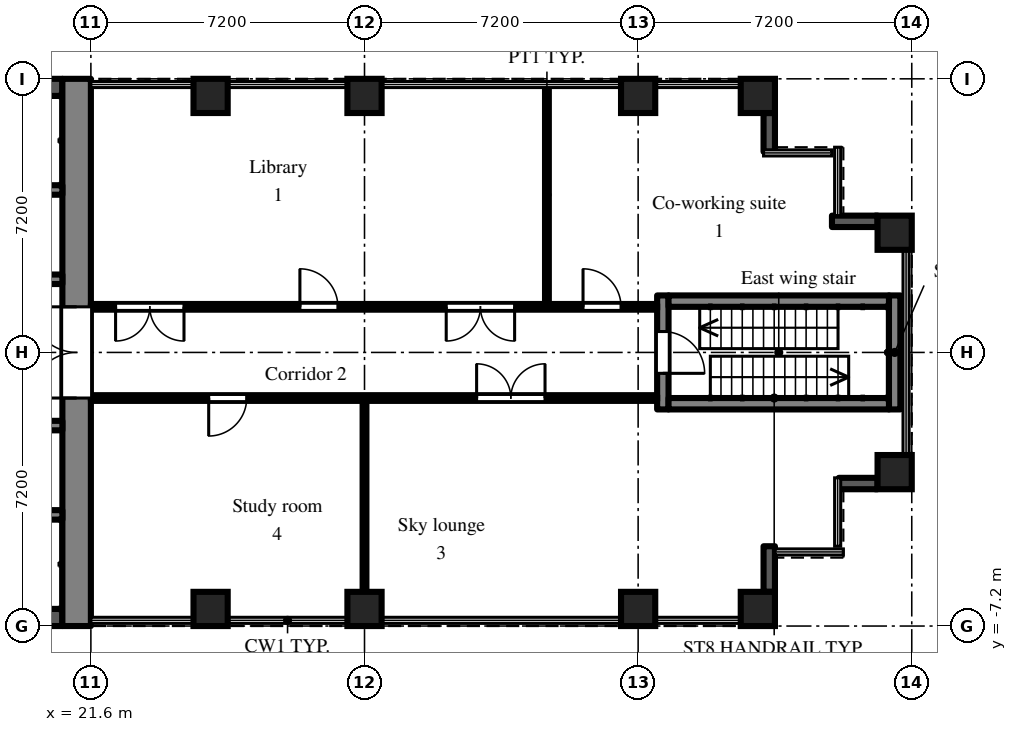
"""IFC4 building model, lengths in metres.
Left out: names, types, materials, properties, quantities, classifications, styles, units other than length and angle.
Written with IfcOpenShell. Run it as: python <this file> out.ifc"""

import sys

from ifc_helpers import new_model, si_unit, direction, frame, frame_2d, origin, origin_2d, place, context, subcontext, project, spatial, rectangle, extrude, element, fill, save


model = new_model("IFC4")
c1 = context("Model", 3, precision=1e-05, world=origin(), true_north=direction((0.0, 1.0)))
c2 = subcontext(c1, "Body", "Model", "MODEL_VIEW")
j1 = project(units=[si_unit("LENGTHUNIT", "METRE"), si_unit("PLANEANGLEUNIT", "RADIAN")], contexts=[c1])
p1 = place(None, origin())
s1 = spatial("IfcSite", under=j1, at=p1, CompositionType="ELEMENT")
p2 = place(p1, origin())
s2 = spatial("IfcBuilding", under=s1, at=p2, CompositionType="ELEMENT")
p3 = place(p2, frame((0.0, 0.0, 116.1)))
s3 = spatial("IfcBuildingStorey", under=s2, at=p3, CompositionType="ELEMENT", Elevation=116.1)
for number, where, z_axis, x_axis in (
    (1, (24.75, -6.75, 0.0), (0.0, 0.0, 1.0), (1.0, 0.0, 0.0)),
    (2, (24.75, 6.75, 0.0), (0.0, 0.0, 1.0), (1.0, 0.0, 0.0)),
    (3, (28.8, -6.75, 0.0), (0.0, 0.0, 1.0), (1.0, 0.0, 0.0)),
    (4, (28.8, 6.75, 0.0), (0.0, 0.0, 1.0), (1.0, 0.0, 0.0)),
    (5, (36.0, -6.75, 0.0), (0.0, 0.0, 1.0), (1.0, 0.0, 0.0)),
    (6, (36.0, 6.75, 0.0), (0.0, 0.0, 1.0), (1.0, 0.0, 0.0)),
    (7, (39.15, -6.75, 0.0), (0.0, 0.0, 1.0), (1.0, 0.0, 0.0)),
    (8, (39.15, 6.75, 0.0), (0.0, 0.0, 1.0), (1.0, 0.0, 0.0)),
    (9, (42.75, -3.15, 0.0), (0.0, 0.0, 1.0), (1.0, 0.0, 0.0)),
    (10, (42.75, 3.15, 0.0), (0.0, 0.0, 1.0), (1.0, 0.0, 0.0)),
):
    element("IfcColumn", number, at=place(p3, frame(where, z_axis=z_axis, x_axis=x_axis)), inside=s3, PredefinedType="COLUMN", context=c2, shape_type="SweptSolid", body=[
        extrude(rectangle(XDim=0.9, YDim=0.9, at=origin_2d()), origin(), (0.0, 0.0, 1.0), 4.2),
    ])
p4 = place(p3, frame((39.45, -6.3, 0.0), z_axis=(0.0, 0.0, 1.0), x_axis=(0.0, 1.0, 0.0)))
e11 = element("IfcWall", 11, at=p4, inside=s3, PredefinedType="SOLIDWALL", context=c2, shape_type="SweptSolid", body=[
    extrude(rectangle(XDim=1.2, YDim=0.3, at=frame_2d((0.6, 0.0))), origin(), (0.0, 0.0, 1.0), 3.8),
])
p5 = place(p3, frame((41.28, -3.45, 0.0), z_axis=(0.0, 0.0, 1.0), x_axis=(1.0, 0.0, 0.0)))
e12 = element("IfcWall", 12, at=p5, inside=s3, PredefinedType="SOLIDWALL", context=c2, shape_type="SweptSolid", body=[
    extrude(rectangle(XDim=1.02, YDim=0.3, at=frame_2d((0.51, 0.0))), origin(), (0.0, 0.0, 1.0), 3.8),
])
p6 = place(p3, frame((42.3, 3.45, 0.0), z_axis=(0.0, 0.0, 1.0), x_axis=(-1.0, 0.0, 0.0)))
e13 = element("IfcWall", 13, at=p6, inside=s3, PredefinedType="SOLIDWALL", context=c2, shape_type="SweptSolid", body=[
    extrude(rectangle(XDim=1.2, YDim=0.3, at=frame_2d((0.6, 0.0))), origin(), (0.0, 0.0, 1.0), 3.8),
])
p7 = place(p3, frame((39.45, 5.28, 0.0), z_axis=(0.0, 0.0, 1.0), x_axis=(0.0, 1.0, 0.0)))
e14 = element("IfcWall", 14, at=p7, inside=s3, PredefinedType="SOLIDWALL", context=c2, shape_type="SweptSolid", body=[
    extrude(rectangle(XDim=1.02, YDim=0.3, at=frame_2d((0.51, 0.0))), origin(), (0.0, 0.0, 1.0), 3.8),
])
p8 = place(p3, frame((21.225, -7.2, 0.0), z_axis=(0.0, 0.0, 1.0), x_axis=(0.0, 1.0, 0.0)))
e15 = element("IfcWall", 15, at=p8, inside=s3, PredefinedType="SHEAR", context=c2, shape_type="SweptSolid", body=[
    extrude(rectangle(XDim=14.4, YDim=0.75, at=frame_2d((7.2, 0.0))), origin(), (0.0, 0.0, 1.0), 3.8),
])
p9 = place(p8, frame((6.0, 0.0, 0.0)))
e16 = element("IfcOpeningElement", 16, at=p9, cuts=e15, PredefinedType="OPENING", context=c2, shape_type="SweptSolid", body=[
    extrude(rectangle(XDim=2.4, YDim=2.2, at=frame_2d((1.2, 1.1))), frame((0.0, 0.385, 0.0), z_axis=(0.0, -1.0, 0.0), x_axis=(1.0, 0.0, 0.0)), (0.0, 0.0, 1.0), 0.77),
])
p10 = place(p3, frame((7.9, 6.975, 0.0), z_axis=(0.0, 0.0, 1.0), x_axis=(1.0, 0.0, 0.0)))
e17 = element("IfcWall", 17, at=p10, inside=s3, PredefinedType="SHEAR", context=c2, shape_type="SweptSolid", body=[
    extrude(rectangle(XDim=12.95, YDim=0.45, at=frame_2d((6.475, 0.0))), origin(), (0.0, 0.0, 1.0), 3.8),
])
p11 = place(p3, frame((7.9, 1.925, 0.0), z_axis=(0.0, 0.0, 1.0), x_axis=(1.0, 0.0, 0.0)))
e18 = element("IfcWall", 18, at=p11, inside=s3, PredefinedType="SHEAR", context=c2, shape_type="SweptSolid", body=[
    extrude(rectangle(XDim=12.95, YDim=0.25, at=frame_2d((6.475, 0.0))), origin(), (0.0, 0.0, 1.0), 3.8),
])
p12 = place(p11, frame((4.825, 0.0, 0.0)))
e19 = element("IfcOpeningElement", 19, at=p12, cuts=e18, PredefinedType="OPENING", context=c2, shape_type="SweptSolid", body=[
    extrude(rectangle(XDim=1.1, YDim=2.1, at=frame_2d((0.55, 1.05))), frame((0.0, 0.135, 0.0), z_axis=(0.0, -1.0, 0.0), x_axis=(1.0, 0.0, 0.0)), (0.0, 0.0, 1.0), 0.27),
])
p13 = place(p11, frame((7.025, 0.0, 0.0)))
e20 = element("IfcOpeningElement", 20, at=p13, cuts=e18, PredefinedType="OPENING", context=c2, shape_type="SweptSolid", body=[
    extrude(rectangle(XDim=1.1, YDim=2.1, at=frame_2d((0.55, 1.05))), frame((0.0, 0.135, 0.0), z_axis=(0.0, -1.0, 0.0), x_axis=(1.0, 0.0, 0.0)), (0.0, 0.0, 1.0), 0.27),
])
p14 = place(p11, frame((9.225, 0.0, 0.0)))
e21 = element("IfcOpeningElement", 21, at=p14, cuts=e18, PredefinedType="OPENING", context=c2, shape_type="SweptSolid", body=[
    extrude(rectangle(XDim=1.1, YDim=2.1, at=frame_2d((0.55, 1.05))), frame((0.0, 0.135, 0.0), z_axis=(0.0, -1.0, 0.0), x_axis=(1.0, 0.0, 0.0)), (0.0, 0.0, 1.0), 0.27),
])
p15 = place(p11, frame((11.425, 0.0, 0.0)))
e22 = element("IfcOpeningElement", 22, at=p15, cuts=e18, PredefinedType="OPENING", context=c2, shape_type="SweptSolid", body=[
    extrude(rectangle(XDim=1.1, YDim=2.1, at=frame_2d((0.55, 1.05))), frame((0.0, 0.135, 0.0), z_axis=(0.0, -1.0, 0.0), x_axis=(1.0, 0.0, 0.0)), (0.0, 0.0, 1.0), 0.27),
])
p16 = place(p11, frame((0.525, 0.0, 0.0)))
e23 = element("IfcOpeningElement", 23, at=p16, cuts=e18, PredefinedType="OPENING", context=c2, shape_type="SweptSolid", body=[
    extrude(rectangle(XDim=0.9, YDim=2.1, at=frame_2d((0.45, 1.05))), frame((0.0, 0.135, 0.0), z_axis=(0.0, -1.0, 0.0), x_axis=(1.0, 0.0, 0.0)), (0.0, 0.0, 1.0), 0.27),
])
p17 = place(p11, frame((2.575, 0.0, 0.0)))
e24 = element("IfcOpeningElement", 24, at=p17, cuts=e18, PredefinedType="OPENING", context=c2, shape_type="SweptSolid", body=[
    extrude(rectangle(XDim=1.2, YDim=2.1, at=frame_2d((0.6, 1.05))), frame((0.0, 0.135, 0.0), z_axis=(0.0, -1.0, 0.0), x_axis=(1.0, 0.0, 0.0)), (0.0, 0.0, 1.0), 0.27),
])
p18 = place(p3, frame((12.3, 4.275, 0.0), z_axis=(0.0, 0.0, 1.0), x_axis=(1.0, 0.0, 0.0)))
e25 = element("IfcWall", 25, at=p18, inside=s3, PredefinedType="SHEAR", context=c2, shape_type="SweptSolid", body=[
    extrude(rectangle(XDim=8.55, YDim=0.25, at=frame_2d((4.275, 0.0))), origin(), (0.0, 0.0, 1.0), 3.8),
])
p19 = place(p3, frame((7.9, -6.975, 0.0), z_axis=(0.0, 0.0, 1.0), x_axis=(1.0, 0.0, 0.0)))
e26 = element("IfcWall", 26, at=p19, inside=s3, PredefinedType="SHEAR", context=c2, shape_type="SweptSolid", body=[
    extrude(rectangle(XDim=12.95, YDim=0.45, at=frame_2d((6.475, 0.0))), origin(), (0.0, 0.0, 1.0), 3.8),
])
p20 = place(p3, frame((7.9, -1.925, 0.0), z_axis=(0.0, 0.0, 1.0), x_axis=(1.0, 0.0, 0.0)))
e27 = element("IfcWall", 27, at=p20, inside=s3, PredefinedType="SHEAR", context=c2, shape_type="SweptSolid", body=[
    extrude(rectangle(XDim=12.95, YDim=0.25, at=frame_2d((6.475, 0.0))), origin(), (0.0, 0.0, 1.0), 3.8),
])
p21 = place(p20, frame((4.825, 0.0, 0.0)))
e28 = element("IfcOpeningElement", 28, at=p21, cuts=e27, PredefinedType="OPENING", context=c2, shape_type="SweptSolid", body=[
    extrude(rectangle(XDim=1.1, YDim=2.1, at=frame_2d((0.55, 1.05))), frame((0.0, 0.135, 0.0), z_axis=(0.0, -1.0, 0.0), x_axis=(1.0, 0.0, 0.0)), (0.0, 0.0, 1.0), 0.27),
])
p22 = place(p20, frame((7.025, 0.0, 0.0)))
e29 = element("IfcOpeningElement", 29, at=p22, cuts=e27, PredefinedType="OPENING", context=c2, shape_type="SweptSolid", body=[
    extrude(rectangle(XDim=1.1, YDim=2.1, at=frame_2d((0.55, 1.05))), frame((0.0, 0.135, 0.0), z_axis=(0.0, -1.0, 0.0), x_axis=(1.0, 0.0, 0.0)), (0.0, 0.0, 1.0), 0.27),
])
p23 = place(p20, frame((9.225, 0.0, 0.0)))
e30 = element("IfcOpeningElement", 30, at=p23, cuts=e27, PredefinedType="OPENING", context=c2, shape_type="SweptSolid", body=[
    extrude(rectangle(XDim=1.1, YDim=2.1, at=frame_2d((0.55, 1.05))), frame((0.0, 0.135, 0.0), z_axis=(0.0, -1.0, 0.0), x_axis=(1.0, 0.0, 0.0)), (0.0, 0.0, 1.0), 0.27),
])
p24 = place(p20, frame((11.425, 0.0, 0.0)))
e31 = element("IfcOpeningElement", 31, at=p24, cuts=e27, PredefinedType="OPENING", context=c2, shape_type="SweptSolid", body=[
    extrude(rectangle(XDim=1.1, YDim=2.1, at=frame_2d((0.55, 1.05))), frame((0.0, 0.135, 0.0), z_axis=(0.0, -1.0, 0.0), x_axis=(1.0, 0.0, 0.0)), (0.0, 0.0, 1.0), 0.27),
])
p25 = place(p20, frame((0.525, 0.0, 0.0)))
e32 = element("IfcOpeningElement", 32, at=p25, cuts=e27, PredefinedType="OPENING", context=c2, shape_type="SweptSolid", body=[
    extrude(rectangle(XDim=0.9, YDim=2.1, at=frame_2d((0.45, 1.05))), frame((0.0, 0.135, 0.0), z_axis=(0.0, -1.0, 0.0), x_axis=(1.0, 0.0, 0.0)), (0.0, 0.0, 1.0), 0.27),
])
p26 = place(p20, frame((2.575, 0.0, 0.0)))
e33 = element("IfcOpeningElement", 33, at=p26, cuts=e27, PredefinedType="OPENING", context=c2, shape_type="SweptSolid", body=[
    extrude(rectangle(XDim=1.2, YDim=2.1, at=frame_2d((0.6, 1.05))), frame((0.0, 0.135, 0.0), z_axis=(0.0, -1.0, 0.0), x_axis=(1.0, 0.0, 0.0)), (0.0, 0.0, 1.0), 0.27),
])
p27 = place(p3, frame((12.3, -4.275, 0.0), z_axis=(0.0, 0.0, 1.0), x_axis=(1.0, 0.0, 0.0)))
e34 = element("IfcWall", 34, at=p27, inside=s3, PredefinedType="SHEAR", context=c2, shape_type="SweptSolid", body=[
    extrude(rectangle(XDim=8.55, YDim=0.25, at=frame_2d((4.275, 0.0))), origin(), (0.0, 0.0, 1.0), 3.8),
])
p28 = place(p3, frame((36.65, -1.5, 0.0), z_axis=(0.0, 0.0, 1.0), x_axis=(0.0, 1.0, 0.0)))
e35 = element("IfcWall", 35, at=p28, inside=s3, PredefinedType="SHEAR", context=c2, shape_type="SweptSolid", body=[
    extrude(rectangle(XDim=3.0, YDim=0.3, at=frame_2d((1.5, 0.0))), origin(), (0.0, 0.0, 1.0), 3.8),
])
p29 = place(p28, frame((0.95, 0.0, 0.0)))
e36 = element("IfcOpeningElement", 36, at=p29, cuts=e35, PredefinedType="OPENING", context=c2, shape_type="SweptSolid", body=[
    extrude(rectangle(XDim=1.1, YDim=2.1, at=frame_2d((0.55, 1.05))), frame((0.0, 0.16, 0.0), z_axis=(0.0, -1.0, 0.0), x_axis=(1.0, 0.0, 0.0)), (0.0, 0.0, 1.0), 0.32),
])
p30 = place(p3, frame((42.75, -1.5, 0.0), z_axis=(0.0, 0.0, 1.0), x_axis=(0.0, 1.0, 0.0)))
e37 = element("IfcWall", 37, at=p30, inside=s3, PredefinedType="SHEAR", context=c2, shape_type="SweptSolid", body=[
    extrude(rectangle(XDim=3.0, YDim=0.3, at=frame_2d((1.5, 0.0))), origin(), (0.0, 0.0, 1.0), 3.8),
])
for number, where, z_axis, x_axis in (
    (38, (36.8, -1.35, 0.0), (0.0, 0.0, 1.0), (1.0, 0.0, 0.0)),
    (39, (36.8, 1.35, 0.0), (0.0, 0.0, 1.0), (1.0, 0.0, 0.0)),
):
    element("IfcWall", number, at=place(p3, frame(where, z_axis=z_axis, x_axis=x_axis)), inside=s3, PredefinedType="SHEAR", context=c2, shape_type="SweptSolid", body=[
        extrude(rectangle(XDim=5.8, YDim=0.3, at=frame_2d((2.9, 0.0))), origin(), (0.0, 0.0, 1.0), 3.8),
    ])
p31 = place(p3, frame((21.6, -1.2, 0.0), z_axis=(0.0, 0.0, 1.0), x_axis=(1.0, 0.0, 0.0)))
e40 = element("IfcWall", 40, at=p31, inside=s3, PredefinedType="PARTITIONING", context=c2, shape_type="SweptSolid", body=[
    extrude(rectangle(XDim=14.9, YDim=0.15, at=frame_2d((7.45, 0.0))), origin(), (0.0, 0.0, 1.0), 3.8),
])
p32 = place(p31, frame((3.1, 0.0, 0.0)))
e41 = element("IfcOpeningElement", 41, at=p32, cuts=e40, PredefinedType="OPENING", context=c2, shape_type="SweptSolid", body=[
    extrude(rectangle(XDim=1.0, YDim=2.1, at=frame_2d((0.5, 1.05))), frame((0.0, 0.085, 0.0), z_axis=(0.0, -1.0, 0.0), x_axis=(1.0, 0.0, 0.0)), (0.0, 0.0, 1.0), 0.17),
])
p33 = place(p31, frame((10.15, 0.0, 0.0)))
e42 = element("IfcOpeningElement", 42, at=p33, cuts=e40, PredefinedType="OPENING", context=c2, shape_type="SweptSolid", body=[
    extrude(rectangle(XDim=1.8, YDim=2.1, at=frame_2d((0.9, 1.05))), frame((0.0, 0.085, 0.0), z_axis=(0.0, -1.0, 0.0), x_axis=(1.0, 0.0, 0.0)), (0.0, 0.0, 1.0), 0.17),
])
p34 = place(p3, frame((21.6, 1.2, 0.0), z_axis=(0.0, 0.0, 1.0), x_axis=(1.0, 0.0, 0.0)))
e43 = element("IfcWall", 43, at=p34, inside=s3, PredefinedType="PARTITIONING", context=c2, shape_type="SweptSolid", body=[
    extrude(rectangle(XDim=14.9, YDim=0.15, at=frame_2d((7.45, 0.0))), origin(), (0.0, 0.0, 1.0), 3.8),
])
p35 = place(p34, frame((0.65, 0.0, 0.0)))
e44 = element("IfcOpeningElement", 44, at=p35, cuts=e43, PredefinedType="OPENING", context=c2, shape_type="SweptSolid", body=[
    extrude(rectangle(XDim=1.8, YDim=2.1, at=frame_2d((0.9, 1.05))), frame((0.0, 0.085, 0.0), z_axis=(0.0, -1.0, 0.0), x_axis=(1.0, 0.0, 0.0)), (0.0, 0.0, 1.0), 0.17),
])
p36 = place(p34, frame((5.5, 0.0, 0.0)))
e45 = element("IfcOpeningElement", 45, at=p36, cuts=e43, PredefinedType="OPENING", context=c2, shape_type="SweptSolid", body=[
    extrude(rectangle(XDim=1.0, YDim=2.1, at=frame_2d((0.5, 1.05))), frame((0.0, 0.085, 0.0), z_axis=(0.0, -1.0, 0.0), x_axis=(1.0, 0.0, 0.0)), (0.0, 0.0, 1.0), 0.17),
])
p37 = place(p34, frame((9.35, 0.0, 0.0)))
e46 = element("IfcOpeningElement", 46, at=p37, cuts=e43, PredefinedType="OPENING", context=c2, shape_type="SweptSolid", body=[
    extrude(rectangle(XDim=1.8, YDim=2.1, at=frame_2d((0.9, 1.05))), frame((0.0, 0.085, 0.0), z_axis=(0.0, -1.0, 0.0), x_axis=(1.0, 0.0, 0.0)), (0.0, 0.0, 1.0), 0.17),
])
p38 = place(p34, frame((12.95, 0.0, 0.0)))
e47 = element("IfcOpeningElement", 47, at=p38, cuts=e43, PredefinedType="OPENING", context=c2, shape_type="SweptSolid", body=[
    extrude(rectangle(XDim=1.0, YDim=2.1, at=frame_2d((0.5, 1.05))), frame((0.0, 0.085, 0.0), z_axis=(0.0, -1.0, 0.0), x_axis=(1.0, 0.0, 0.0)), (0.0, 0.0, 1.0), 0.17),
])
p39 = place(p3, frame((28.8, -6.9, 0.0), z_axis=(0.0, 0.0, 1.0), x_axis=(0.0, 1.0, 0.0)))
e48 = element("IfcWall", 48, at=p39, inside=s3, PredefinedType="PARTITIONING", context=c2, shape_type="SweptSolid", body=[
    extrude(rectangle(XDim=5.625, YDim=0.1, at=frame_2d((2.812, 0.0))), origin(), (0.0, 0.0, 1.0), 3.8),
])
p40 = place(p3, frame((33.6, 1.275, 0.0), z_axis=(0.0, 0.0, 1.0), x_axis=(0.0, 1.0, 0.0)))
e49 = element("IfcWall", 49, at=p40, inside=s3, PredefinedType="PARTITIONING", context=c2, shape_type="SweptSolid", body=[
    extrude(rectangle(XDim=5.745, YDim=0.1, at=frame_2d((2.873, 0.0))), origin(), (0.0, 0.0, 1.0), 3.8),
])
p41 = place(p9, origin())
e50 = element("IfcDoor", 50, at=p41, inside=s3, OperationType="DOUBLE_DOOR_DOUBLE_SWING", PredefinedType="DOOR", context=c2, shape_type="SweptSolid", body=[
    extrude(rectangle(XDim=2.4, YDim=2.2, at=frame_2d((1.2, 1.1))), frame((0.0, 0.025, 0.0), z_axis=(0.0, -1.0, 0.0), x_axis=(1.0, 0.0, 0.0)), (0.0, 0.0, 1.0), 0.05),
])
fill(e16, e50)
p42 = place(p29, frame((1.1, 0.0, 0.0), z_axis=(0.0, 0.0, 1.0), x_axis=(-1.0, 0.0, 0.0)))
e51 = element("IfcDoor", 51, at=p42, inside=s3, OperationType="SINGLE_SWING_RIGHT", PredefinedType="DOOR", context=c2, shape_type="SweptSolid", body=[
    extrude(rectangle(XDim=1.1, YDim=2.1, at=frame_2d((0.55, 1.05))), frame((0.0, 0.025, 0.0), z_axis=(0.0, -1.0, 0.0), x_axis=(1.0, 0.0, 0.0)), (0.0, 0.0, 1.0), 0.05),
])
fill(e36, e51)
p43 = place(p35, frame((1.8, 0.0, 0.0), z_axis=(0.0, 0.0, 1.0), x_axis=(-1.0, 0.0, 0.0)))
e52 = element("IfcDoor", 52, at=p43, inside=s3, OperationType="DOUBLE_DOOR_DOUBLE_SWING", PredefinedType="DOOR", context=c2, shape_type="SweptSolid", body=[
    extrude(rectangle(XDim=1.8, YDim=2.1, at=frame_2d((0.9, 1.05))), frame((0.0, 0.025, 0.0), z_axis=(0.0, -1.0, 0.0), x_axis=(1.0, 0.0, 0.0)), (0.0, 0.0, 1.0), 0.05),
])
fill(e44, e52)
p44 = place(p36, origin())
e53 = element("IfcDoor", 53, at=p44, inside=s3, OperationType="SINGLE_SWING_LEFT", PredefinedType="DOOR", context=c2, shape_type="SweptSolid", body=[
    extrude(rectangle(XDim=1.0, YDim=2.1, at=frame_2d((0.5, 1.05))), frame((0.0, 0.025, 0.0), z_axis=(0.0, -1.0, 0.0), x_axis=(1.0, 0.0, 0.0)), (0.0, 0.0, 1.0), 0.05),
])
fill(e45, e53)
p45 = place(p37, frame((1.8, 0.0, 0.0), z_axis=(0.0, 0.0, 1.0), x_axis=(-1.0, 0.0, 0.0)))
e54 = element("IfcDoor", 54, at=p45, inside=s3, OperationType="DOUBLE_DOOR_DOUBLE_SWING", PredefinedType="DOOR", context=c2, shape_type="SweptSolid", body=[
    extrude(rectangle(XDim=1.8, YDim=2.1, at=frame_2d((0.9, 1.05))), frame((0.0, 0.025, 0.0), z_axis=(0.0, -1.0, 0.0), x_axis=(1.0, 0.0, 0.0)), (0.0, 0.0, 1.0), 0.05),
])
fill(e46, e54)
p46 = place(p38, origin())
e55 = element("IfcDoor", 55, at=p46, inside=s3, OperationType="SINGLE_SWING_LEFT", PredefinedType="DOOR", context=c2, shape_type="SweptSolid", body=[
    extrude(rectangle(XDim=1.0, YDim=2.1, at=frame_2d((0.5, 1.05))), frame((0.0, 0.025, 0.0), z_axis=(0.0, -1.0, 0.0), x_axis=(1.0, 0.0, 0.0)), (0.0, 0.0, 1.0), 0.05),
])
fill(e47, e55)
p47 = place(p32, frame((1.0, 0.0, 0.0), z_axis=(0.0, 0.0, 1.0), x_axis=(-1.0, 0.0, 0.0)))
e56 = element("IfcDoor", 56, at=p47, inside=s3, OperationType="SINGLE_SWING_RIGHT", PredefinedType="DOOR", context=c2, shape_type="SweptSolid", body=[
    extrude(rectangle(XDim=1.0, YDim=2.1, at=frame_2d((0.5, 1.05))), frame((0.0, 0.025, 0.0), z_axis=(0.0, -1.0, 0.0), x_axis=(1.0, 0.0, 0.0)), (0.0, 0.0, 1.0), 0.05),
])
fill(e41, e56)
p48 = place(p33, origin())
e57 = element("IfcDoor", 57, at=p48, inside=s3, OperationType="DOUBLE_DOOR_DOUBLE_SWING", PredefinedType="DOOR", context=c2, shape_type="SweptSolid", body=[
    extrude(rectangle(XDim=1.8, YDim=2.1, at=frame_2d((0.9, 1.05))), frame((0.0, 0.025, 0.0), z_axis=(0.0, -1.0, 0.0), x_axis=(1.0, 0.0, 0.0)), (0.0, 0.0, 1.0), 0.05),
])
fill(e42, e57)
save(model, sys.argv[1])
